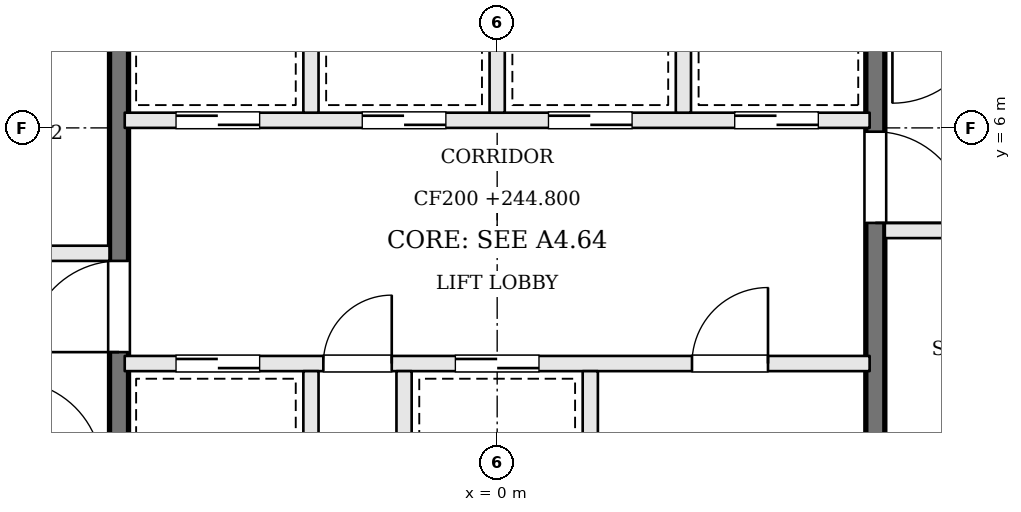
"""IFC4 building model, lengths in metres.
Left out: names, types, materials, properties, quantities, classifications, styles, units other than length and angle.
Written with IfcOpenShell. Run it as: python <this file> out.ifc"""

import sys

from ifc_helpers import new_model, si_unit, direction, frame, frame_2d, origin, place, context, subcontext, project, spatial, rectangle, extrude, element, fill, save


model = new_model("IFC4")
c1 = context("Model", 3, precision=1e-05, world=origin(), true_north=direction((0.0, 1.0)))
c2 = subcontext(c1, "Body", "Model", "MODEL_VIEW")
j1 = project(units=[si_unit("LENGTHUNIT", "METRE"), si_unit("PLANEANGLEUNIT", "RADIAN")], contexts=[c1])
p1 = place(None, origin())
s1 = spatial("IfcSite", under=j1, at=p1, CompositionType="ELEMENT")
p2 = place(p1, origin())
s2 = spatial("IfcBuilding", under=s1, at=p2, CompositionType="ELEMENT")
p3 = place(p2, frame((0.0, 0.0, 244.8)))
s3 = spatial("IfcBuildingStorey", under=s2, at=p3, CompositionType="ELEMENT", Elevation=244.8)
p4 = place(p3, frame((-12.2, 4.35, 0.0), z_axis=(0.0, 0.0, 1.0), x_axis=(1.0, 0.0, 0.0)))
e1 = element("IfcWall", 1, at=p4, inside=s3, PredefinedType="SOLIDWALL", context=c2, shape_type="SweptSolid", body=[
    extrude(rectangle(XDim=7.1, YDim=0.2, at=frame_2d((3.55, 0.0))), origin(), (0.0, 0.0, 1.0), 3.7),
])
p5 = place(p4, frame((4.4, 0.0, 0.0)))
e2 = element("IfcOpeningElement", 2, at=p5, cuts=e1, PredefinedType="OPENING", context=c2, shape_type="SweptSolid", body=[
    extrude(rectangle(XDim=1.2, YDim=2.1, at=frame_2d((0.6, 1.05))), frame((0.0, 0.11, 0.0), z_axis=(0.0, -1.0, 0.0), x_axis=(1.0, 0.0, 0.0)), (0.0, 0.0, 1.0), 0.22),
])
p6 = place(p4, frame((1.1, 0.0, 0.0)))
e3 = element("IfcOpeningElement", 3, at=p6, cuts=e1, PredefinedType="OPENING", context=c2, shape_type="SweptSolid", body=[
    extrude(rectangle(XDim=1.2, YDim=2.1, at=frame_2d((0.6, 1.05))), frame((0.0, 0.11, 0.0), z_axis=(0.0, -1.0, 0.0), x_axis=(1.0, 0.0, 0.0)), (0.0, 0.0, 1.0), 0.22),
])
p7 = place(p3, frame((12.2, 4.65, 0.0), z_axis=(0.0, 0.0, 1.0), x_axis=(-1.0, 0.0, 0.0)))
e4 = element("IfcWall", 4, at=p7, inside=s3, PredefinedType="SOLIDWALL", context=c2, shape_type="SweptSolid", body=[
    extrude(rectangle(XDim=7.1, YDim=0.2, at=frame_2d((3.55, 0.0))), origin(), (0.0, 0.0, 1.0), 3.7),
])
p8 = place(p7, frame((4.4, 0.0, 0.0)))
e5 = element("IfcOpeningElement", 5, at=p8, cuts=e4, PredefinedType="OPENING", context=c2, shape_type="SweptSolid", body=[
    extrude(rectangle(XDim=1.2, YDim=2.1, at=frame_2d((0.6, 1.05))), frame((0.0, 0.11, 0.0), z_axis=(0.0, -1.0, 0.0), x_axis=(1.0, 0.0, 0.0)), (0.0, 0.0, 1.0), 0.22),
])
p9 = place(p7, frame((1.1, 0.0, 0.0)))
e6 = element("IfcOpeningElement", 6, at=p9, cuts=e4, PredefinedType="OPENING", context=c2, shape_type="SweptSolid", body=[
    extrude(rectangle(XDim=1.2, YDim=2.1, at=frame_2d((0.6, 1.05))), frame((0.0, 0.11, 0.0), z_axis=(0.0, -1.0, 0.0), x_axis=(1.0, 0.0, 0.0)), (0.0, 0.0, 1.0), 0.22),
])
p10 = place(p3, frame((-4.975, -2.2, 0.0), z_axis=(0.0, 0.0, 1.0), x_axis=(0.0, 1.0, 0.0)))
e7 = element("IfcWall", 7, at=p10, inside=s3, PredefinedType="SOLIDWALL", context=c2, shape_type="SweptSolid", body=[
    extrude(rectangle(XDim=13.4, YDim=0.25, at=frame_2d((6.7, 0.0))), origin(), (0.0, 0.0, 1.0), 3.7),
])
p11 = place(p10, frame((5.25, 0.0, 0.0)))
e8 = element("IfcOpeningElement", 8, at=p11, cuts=e7, PredefinedType="OPENING", context=c2, shape_type="SweptSolid", body=[
    extrude(rectangle(XDim=1.2, YDim=2.1, at=frame_2d((0.6, 1.05))), frame((0.0, 0.135, 0.0), z_axis=(0.0, -1.0, 0.0), x_axis=(1.0, 0.0, 0.0)), (0.0, 0.0, 1.0), 0.27),
])
p12 = place(p3, frame((4.975, 11.2, 0.0), z_axis=(0.0, 0.0, 1.0), x_axis=(0.0, -1.0, 0.0)))
e9 = element("IfcWall", 9, at=p12, inside=s3, PredefinedType="SOLIDWALL", context=c2, shape_type="SweptSolid", body=[
    extrude(rectangle(XDim=13.4, YDim=0.25, at=frame_2d((6.7, 0.0))), origin(), (0.0, 0.0, 1.0), 3.7),
])
p13 = place(p12, frame((5.25, 0.0, 0.0)))
e10 = element("IfcOpeningElement", 10, at=p13, cuts=e9, PredefinedType="OPENING", context=c2, shape_type="SweptSolid", body=[
    extrude(rectangle(XDim=1.2, YDim=2.1, at=frame_2d((0.6, 1.05))), frame((0.0, 0.135, 0.0), z_axis=(0.0, -1.0, 0.0), x_axis=(1.0, 0.0, 0.0)), (0.0, 0.0, 1.0), 0.27),
])
p14 = place(p3, frame((-4.9, 2.9, 0.0), z_axis=(0.0, 0.0, 1.0), x_axis=(1.0, 0.0, 0.0)))
e11 = element("IfcWall", 11, at=p14, inside=s3, PredefinedType="SOLIDWALL", context=c2, shape_type="SweptSolid", body=[
    extrude(rectangle(XDim=9.8, YDim=0.2, at=frame_2d((4.9, 0.0))), origin(), (0.0, 0.0, 1.0), 3.7),
])
p15 = place(p14, frame((0.675, 0.0, 0.0)))
e12 = element("IfcOpeningElement", 12, at=p15, cuts=e11, PredefinedType="OPENING", context=c2, shape_type="SweptSolid", body=[
    extrude(rectangle(XDim=1.1, YDim=2.1, at=frame_2d((0.55, 1.05))), frame((0.0, 0.11, 0.0), z_axis=(0.0, -1.0, 0.0), x_axis=(1.0, 0.0, 0.0)), (0.0, 0.0, 1.0), 0.22),
])
p16 = place(p14, frame((2.613, 0.0, 0.0)))
e13 = element("IfcOpeningElement", 13, at=p16, cuts=e11, PredefinedType="OPENING", context=c2, shape_type="SweptSolid", body=[
    extrude(rectangle(XDim=0.9, YDim=2.1, at=frame_2d((0.45, 1.05))), frame((0.0, 0.11, 0.0), z_axis=(0.0, -1.0, 0.0), x_axis=(1.0, 0.0, 0.0)), (0.0, 0.0, 1.0), 0.22),
])
p17 = place(p14, frame((4.35, 0.0, 0.0)))
e14 = element("IfcOpeningElement", 14, at=p17, cuts=e11, PredefinedType="OPENING", context=c2, shape_type="SweptSolid", body=[
    extrude(rectangle(XDim=1.1, YDim=2.1, at=frame_2d((0.55, 1.05))), frame((0.0, 0.11, 0.0), z_axis=(0.0, -1.0, 0.0), x_axis=(1.0, 0.0, 0.0)), (0.0, 0.0, 1.0), 0.22),
])
p18 = place(p14, frame((7.463, 0.0, 0.0)))
e15 = element("IfcOpeningElement", 15, at=p18, cuts=e11, PredefinedType="OPENING", context=c2, shape_type="SweptSolid", body=[
    extrude(rectangle(XDim=1.0, YDim=2.1, at=frame_2d((0.5, 1.05))), frame((0.0, 0.11, 0.0), z_axis=(0.0, -1.0, 0.0), x_axis=(1.0, 0.0, 0.0)), (0.0, 0.0, 1.0), 0.22),
])
p19 = place(p3, frame((-4.9, 6.1, 0.0), z_axis=(0.0, 0.0, 1.0), x_axis=(1.0, 0.0, 0.0)))
e16 = element("IfcWall", 16, at=p19, inside=s3, PredefinedType="SOLIDWALL", context=c2, shape_type="SweptSolid", body=[
    extrude(rectangle(XDim=9.8, YDim=0.2, at=frame_2d((4.9, 0.0))), origin(), (0.0, 0.0, 1.0), 3.7),
])
p20 = place(p19, frame((0.675, 0.0, 0.0)))
e17 = element("IfcOpeningElement", 17, at=p20, cuts=e16, PredefinedType="OPENING", context=c2, shape_type="SweptSolid", body=[
    extrude(rectangle(XDim=1.1, YDim=2.1, at=frame_2d((0.55, 1.05))), frame((0.0, 0.11, 0.0), z_axis=(0.0, -1.0, 0.0), x_axis=(1.0, 0.0, 0.0)), (0.0, 0.0, 1.0), 0.22),
])
p21 = place(p19, frame((3.125, 0.0, 0.0)))
e18 = element("IfcOpeningElement", 18, at=p21, cuts=e16, PredefinedType="OPENING", context=c2, shape_type="SweptSolid", body=[
    extrude(rectangle(XDim=1.1, YDim=2.1, at=frame_2d((0.55, 1.05))), frame((0.0, 0.11, 0.0), z_axis=(0.0, -1.0, 0.0), x_axis=(1.0, 0.0, 0.0)), (0.0, 0.0, 1.0), 0.22),
])
p22 = place(p19, frame((5.575, 0.0, 0.0)))
e19 = element("IfcOpeningElement", 19, at=p22, cuts=e16, PredefinedType="OPENING", context=c2, shape_type="SweptSolid", body=[
    extrude(rectangle(XDim=1.1, YDim=2.1, at=frame_2d((0.55, 1.05))), frame((0.0, 0.11, 0.0), z_axis=(0.0, -1.0, 0.0), x_axis=(1.0, 0.0, 0.0)), (0.0, 0.0, 1.0), 0.22),
])
p23 = place(p19, frame((8.025, 0.0, 0.0)))
e20 = element("IfcOpeningElement", 20, at=p23, cuts=e16, PredefinedType="OPENING", context=c2, shape_type="SweptSolid", body=[
    extrude(rectangle(XDim=1.1, YDim=2.1, at=frame_2d((0.55, 1.05))), frame((0.0, 0.11, 0.0), z_axis=(0.0, -1.0, 0.0), x_axis=(1.0, 0.0, 0.0)), (0.0, 0.0, 1.0), 0.22),
])
for number, where, z_axis, x_axis in (
    (21, (-2.45, 0.6, 0.0), (0.0, 0.0, 1.0), (0.0, 1.0, 0.0)),
    (22, (-1.225, 0.6, 0.0), (0.0, 0.0, 1.0), (0.0, 1.0, 0.0)),
    (23, (1.225, 0.6, 0.0), (0.0, 0.0, 1.0), (0.0, 1.0, 0.0)),
    (24, (-2.45, 6.2, 0.0), (0.0, 0.0, 1.0), (0.0, 1.0, 0.0)),
    (25, (0.0, 6.2, 0.0), (0.0, 0.0, 1.0), (0.0, 1.0, 0.0)),
    (26, (2.45, 6.2, 0.0), (0.0, 0.0, 1.0), (0.0, 1.0, 0.0)),
):
    element("IfcWall", number, at=place(p3, frame(where, z_axis=z_axis, x_axis=x_axis)), inside=s3, PredefinedType="SOLIDWALL", context=c2, shape_type="SweptSolid", body=[
        extrude(rectangle(XDim=2.2, YDim=0.2, at=frame_2d((1.1, 0.0))), origin(), (0.0, 0.0, 1.0), 3.7),
    ])
p24 = place(p11, origin())
e27 = element("IfcDoor", 27, at=p24, inside=s3, OperationType="SINGLE_SWING_LEFT", PredefinedType="DOOR", context=c2, shape_type="SweptSolid", body=[
    extrude(rectangle(XDim=1.2, YDim=2.1, at=frame_2d((0.6, 1.05))), frame((0.0, 0.025, 0.0), z_axis=(0.0, -1.0, 0.0), x_axis=(1.0, 0.0, 0.0)), (0.0, 0.0, 1.0), 0.05),
])
fill(e8, e27)
p25 = place(p13, origin())
e28 = element("IfcDoor", 28, at=p25, inside=s3, OperationType="SINGLE_SWING_RIGHT", PredefinedType="DOOR", context=c2, shape_type="SweptSolid", body=[
    extrude(rectangle(XDim=1.2, YDim=2.1, at=frame_2d((0.6, 1.05))), frame((0.0, 0.025, 0.0), z_axis=(0.0, -1.0, 0.0), x_axis=(1.0, 0.0, 0.0)), (0.0, 0.0, 1.0), 0.05),
])
fill(e10, e28)
p26 = place(p15, origin())
e29 = element("IfcDoor", 29, at=p26, inside=s3, OperationType="SLIDING_TO_RIGHT", PredefinedType="DOOR", context=c2, shape_type="SweptSolid", body=[
    extrude(rectangle(XDim=1.1, YDim=2.1, at=frame_2d((0.55, 1.05))), frame((0.0, 0.025, 0.0), z_axis=(0.0, -1.0, 0.0), x_axis=(1.0, 0.0, 0.0)), (0.0, 0.0, 1.0), 0.05),
])
fill(e12, e29)
p27 = place(p16, origin())
e30 = element("IfcDoor", 30, at=p27, inside=s3, OperationType="SINGLE_SWING_RIGHT", PredefinedType="DOOR", context=c2, shape_type="SweptSolid", body=[
    extrude(rectangle(XDim=0.9, YDim=2.1, at=frame_2d((0.45, 1.05))), frame((0.0, 0.025, 0.0), z_axis=(0.0, -1.0, 0.0), x_axis=(1.0, 0.0, 0.0)), (0.0, 0.0, 1.0), 0.05),
])
fill(e13, e30)
p28 = place(p17, origin())
e31 = element("IfcDoor", 31, at=p28, inside=s3, OperationType="SLIDING_TO_LEFT", PredefinedType="DOOR", context=c2, shape_type="SweptSolid", body=[
    extrude(rectangle(XDim=1.1, YDim=2.1, at=frame_2d((0.55, 1.05))), frame((0.0, 0.025, 0.0), z_axis=(0.0, -1.0, 0.0), x_axis=(1.0, 0.0, 0.0)), (0.0, 0.0, 1.0), 0.05),
])
fill(e14, e31)
p29 = place(p18, origin())
e32 = element("IfcDoor", 32, at=p29, inside=s3, OperationType="SINGLE_SWING_RIGHT", PredefinedType="DOOR", context=c2, shape_type="SweptSolid", body=[
    extrude(rectangle(XDim=1.0, YDim=2.1, at=frame_2d((0.5, 1.05))), frame((0.0, 0.025, 0.0), z_axis=(0.0, -1.0, 0.0), x_axis=(1.0, 0.0, 0.0)), (0.0, 0.0, 1.0), 0.05),
])
fill(e15, e32)
p30 = place(p20, origin())
e33 = element("IfcDoor", 33, at=p30, inside=s3, OperationType="SLIDING_TO_RIGHT", PredefinedType="DOOR", context=c2, shape_type="SweptSolid", body=[
    extrude(rectangle(XDim=1.1, YDim=2.1, at=frame_2d((0.55, 1.05))), frame((0.0, 0.025, 0.0), z_axis=(0.0, -1.0, 0.0), x_axis=(1.0, 0.0, 0.0)), (0.0, 0.0, 1.0), 0.05),
])
fill(e17, e33)
p31 = place(p21, origin())
e34 = element("IfcDoor", 34, at=p31, inside=s3, OperationType="SLIDING_TO_LEFT", PredefinedType="DOOR", context=c2, shape_type="SweptSolid", body=[
    extrude(rectangle(XDim=1.1, YDim=2.1, at=frame_2d((0.55, 1.05))), frame((0.0, 0.025, 0.0), z_axis=(0.0, -1.0, 0.0), x_axis=(1.0, 0.0, 0.0)), (0.0, 0.0, 1.0), 0.05),
])
fill(e18, e34)
p32 = place(p22, origin())
e35 = element("IfcDoor", 35, at=p32, inside=s3, OperationType="SLIDING_TO_RIGHT", PredefinedType="DOOR", context=c2, shape_type="SweptSolid", body=[
    extrude(rectangle(XDim=1.1, YDim=2.1, at=frame_2d((0.55, 1.05))), frame((0.0, 0.025, 0.0), z_axis=(0.0, -1.0, 0.0), x_axis=(1.0, 0.0, 0.0)), (0.0, 0.0, 1.0), 0.05),
])
fill(e19, e35)
p33 = place(p23, origin())
e36 = element("IfcDoor", 36, at=p33, inside=s3, OperationType="SLIDING_TO_LEFT", PredefinedType="DOOR", context=c2, shape_type="SweptSolid", body=[
    extrude(rectangle(XDim=1.1, YDim=2.1, at=frame_2d((0.55, 1.05))), frame((0.0, 0.025, 0.0), z_axis=(0.0, -1.0, 0.0), x_axis=(1.0, 0.0, 0.0)), (0.0, 0.0, 1.0), 0.05),
])
fill(e20, e36)
save(model, sys.argv[1])
